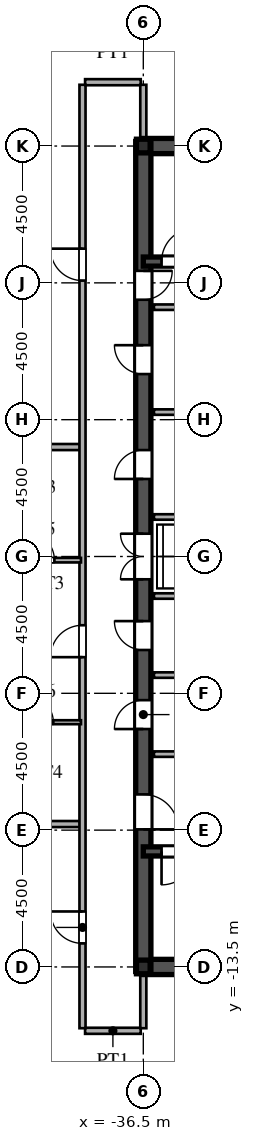
"""IFC4 building model, lengths in metres.
Left out: names, types, materials, properties, quantities, classifications, styles, units other than length and angle.
Written with IfcOpenShell. Run it as: python <this file> out.ifc"""

import sys

from ifc_helpers import new_model, si_unit, direction, frame, frame_2d, origin, origin_2d, place, context, subcontext, project, spatial, rectangle, i_section, extrude, source, transform, mapped, element, fill, save


model = new_model("IFC4")
c1 = context("Model", 3, precision=1e-05, world=origin(), true_north=direction((0.0, 1.0)))
c2 = subcontext(c1, "Body", "Model", "MODEL_VIEW")
j1 = project(units=[si_unit("LENGTHUNIT", "METRE"), si_unit("PLANEANGLEUNIT", "RADIAN")], contexts=[c1])
p1 = place(None, origin())
s1 = spatial("IfcSite", under=j1, at=p1, CompositionType="ELEMENT")
p2 = place(p1, origin())
s2 = spatial("IfcBuilding", under=s1, at=p2, CompositionType="ELEMENT")
p3 = place(p2, frame((0.0, 0.0, 243.15)))
s3 = spatial("IfcBuildingStorey", under=s2, at=p3, CompositionType="ELEMENT", Elevation=243.15)
m1 = source(origin(), c2, "Body", "SweptSolid", [
    extrude(i_section(OverallWidth=0.45, OverallDepth=0.45, WebThickness=0.016, FlangeThickness=0.025, at=origin_2d()), origin(), (0.0, 0.0, 1.0), 3.75),
])
for number, where, z_axis, x_axis in (
    (1, (-36.5, -13.5, 0.0), (0.0, 0.0, 1.0), (1.0, 0.0, 0.0)),
    (2, (-36.5, 13.5, 0.0), (0.0, 0.0, 1.0), (1.0, 0.0, 0.0)),
):
    element("IfcColumn", number, at=place(p3, frame(where, z_axis=z_axis, x_axis=x_axis)), inside=s3, PredefinedType="COLUMN", context=c2, shape_type="MappedRepresentation", body=[
        mapped(m1, transform((0.0, 0.0, 0.0), scale=1.0)),
    ])
for number, where, z_axis, x_axis in (
    (3, (-36.5, -13.5, 0.0), (0.0, 0.0, 1.0), (1.0, 0.0, 0.0)),
    (4, (-36.5, 13.5, 0.0), (0.0, 0.0, 1.0), (1.0, 0.0, 0.0)),
):
    element("IfcWall", number, at=place(p3, frame(where, z_axis=z_axis, x_axis=x_axis)), inside=s3, PredefinedType="SHEAR", context=c2, shape_type="SweptSolid", body=[
        extrude(rectangle(XDim=9.0, YDim=0.5, at=frame_2d((4.5, 0.0))), origin(), (0.0, 0.0, 1.0), 3.53),
    ])
p4 = place(p3, frame((-36.5, -13.65, 0.0), z_axis=(0.0, 0.0, 1.0), x_axis=(0.0, 1.0, 0.0)))
e5 = element("IfcWall", 5, at=p4, inside=s3, PredefinedType="SHEAR", context=c2, shape_type="SweptSolid", body=[
    extrude(rectangle(XDim=7.15, YDim=0.5, at=frame_2d((3.575, 0.0))), origin(), (0.0, 0.0, 1.0), 3.53),
])
p5 = place(p4, frame((4.675, 0.0, 0.0)))
e6 = element("IfcOpeningElement", 6, at=p5, cuts=e5, PredefinedType="OPENING", context=c2, shape_type="SweptSolid", body=[
    extrude(rectangle(XDim=1.15, YDim=2.2, at=frame_2d((0.575, 1.1))), frame((0.0, 0.26, 0.0), z_axis=(0.0, -1.0, 0.0), x_axis=(1.0, 0.0, 0.0)), (0.0, 0.0, 1.0), 0.52),
])
p6 = place(p3, frame((-36.5, -1.3, 0.0), z_axis=(0.0, 0.0, 1.0), x_axis=(0.0, 1.0, 0.0)))
e7 = element("IfcWall", 7, at=p6, inside=s3, PredefinedType="SHEAR", context=c2, shape_type="SweptSolid", body=[
    extrude(rectangle(XDim=2.6, YDim=0.5, at=frame_2d((1.3, 0.0))), origin(), (0.0, 0.0, 1.0), 3.53),
])
p7 = place(p6, frame((0.55, 0.0, 0.0)))
e8 = element("IfcOpeningElement", 8, at=p7, cuts=e7, PredefinedType="OPENING", context=c2, shape_type="SweptSolid", body=[
    extrude(rectangle(XDim=1.5, YDim=2.3, at=frame_2d((0.75, 1.15))), frame((0.0, 0.26, 0.0), z_axis=(0.0, -1.0, 0.0), x_axis=(1.0, 0.0, 0.0)), (0.0, 0.0, 1.0), 0.52),
])
p8 = place(p3, frame((-36.5, 8.2, 0.0), z_axis=(0.0, 0.0, 1.0), x_axis=(0.0, 1.0, 0.0)))
e9 = element("IfcWall", 9, at=p8, inside=s3, PredefinedType="SHEAR", context=c2, shape_type="SweptSolid", body=[
    extrude(rectangle(XDim=5.45, YDim=0.5, at=frame_2d((2.725, 0.0))), origin(), (0.0, 0.0, 1.0), 3.53),
])
p9 = place(p8, frame((0.245, 0.0, 0.0)))
e10 = element("IfcOpeningElement", 10, at=p9, cuts=e9, PredefinedType="OPENING", context=c2, shape_type="SweptSolid", body=[
    extrude(rectangle(XDim=0.95, YDim=2.15, at=frame_2d((0.475, 1.075))), frame((0.0, 0.26, 0.0), z_axis=(0.0, -1.0, 0.0), x_axis=(1.0, 0.0, 0.0)), (0.0, 0.0, 1.0), 0.52),
])
p10 = place(p3, frame((-36.5, -6.5, 0.0), z_axis=(0.0, 0.0, 1.0), x_axis=(0.0, 1.0, 0.0)))
e11 = element("IfcWall", 11, at=p10, inside=s3, PredefinedType="SHEAR", context=c2, shape_type="SweptSolid", body=[
    extrude(rectangle(XDim=2.6, YDim=0.5, at=frame_2d((1.3, 0.0))), origin(), (0.0, 0.0, 1.0), 3.53),
])
p11 = place(p10, frame((0.825, 0.0, 0.0)))
e12 = element("IfcOpeningElement", 12, at=p11, cuts=e11, PredefinedType="OPENING", context=c2, shape_type="SweptSolid", body=[
    extrude(rectangle(XDim=0.95, YDim=2.15, at=frame_2d((0.475, 1.075))), frame((0.0, 0.26, 0.0), z_axis=(0.0, -1.0, 0.0), x_axis=(1.0, 0.0, 0.0)), (0.0, 0.0, 1.0), 0.52),
])
p12 = place(p3, frame((-36.5, -3.9, 0.0), z_axis=(0.0, 0.0, 1.0), x_axis=(0.0, 1.0, 0.0)))
e13 = element("IfcWall", 13, at=p12, inside=s3, PredefinedType="SHEAR", context=c2, shape_type="SweptSolid", body=[
    extrude(rectangle(XDim=2.6, YDim=0.5, at=frame_2d((1.3, 0.0))), origin(), (0.0, 0.0, 1.0), 3.53),
])
p13 = place(p12, frame((0.825, 0.0, 0.0)))
e14 = element("IfcOpeningElement", 14, at=p13, cuts=e13, PredefinedType="OPENING", context=c2, shape_type="SweptSolid", body=[
    extrude(rectangle(XDim=0.95, YDim=2.15, at=frame_2d((0.475, 1.075))), frame((0.0, 0.26, 0.0), z_axis=(0.0, -1.0, 0.0), x_axis=(1.0, 0.0, 0.0)), (0.0, 0.0, 1.0), 0.52),
])
p14 = place(p3, frame((-36.5, 1.3, 0.0), z_axis=(0.0, 0.0, 1.0), x_axis=(0.0, 1.0, 0.0)))
e15 = element("IfcWall", 15, at=p14, inside=s3, PredefinedType="SHEAR", context=c2, shape_type="SweptSolid", body=[
    extrude(rectangle(XDim=3.45, YDim=0.5, at=frame_2d((1.725, 0.0))), origin(), (0.0, 0.0, 1.0), 3.53),
])
p15 = place(p14, frame((1.25, 0.0, 0.0)))
e16 = element("IfcOpeningElement", 16, at=p15, cuts=e15, PredefinedType="OPENING", context=c2, shape_type="SweptSolid", body=[
    extrude(rectangle(XDim=0.95, YDim=2.15, at=frame_2d((0.475, 1.075))), frame((0.0, 0.26, 0.0), z_axis=(0.0, -1.0, 0.0), x_axis=(1.0, 0.0, 0.0)), (0.0, 0.0, 1.0), 0.52),
])
p16 = place(p3, frame((-36.5, 4.75, 0.0), z_axis=(0.0, 0.0, 1.0), x_axis=(0.0, 1.0, 0.0)))
e17 = element("IfcWall", 17, at=p16, inside=s3, PredefinedType="SHEAR", context=c2, shape_type="SweptSolid", body=[
    extrude(rectangle(XDim=3.45, YDim=0.5, at=frame_2d((1.725, 0.0))), origin(), (0.0, 0.0, 1.0), 3.53),
])
p17 = place(p16, frame((1.25, 0.0, 0.0)))
e18 = element("IfcOpeningElement", 18, at=p17, cuts=e17, PredefinedType="OPENING", context=c2, shape_type="SweptSolid", body=[
    extrude(rectangle(XDim=0.95, YDim=2.15, at=frame_2d((0.475, 1.075))), frame((0.0, 0.26, 0.0), z_axis=(0.0, -1.0, 0.0), x_axis=(1.0, 0.0, 0.0)), (0.0, 0.0, 1.0), 0.52),
])
p18 = place(p3, frame((-36.5, -9.7, 0.0), z_axis=(0.0, 0.0, 1.0), x_axis=(1.0, 0.0, 0.0)))
e19 = element("IfcWall", 19, at=p18, inside=s3, PredefinedType="SHEAR", context=c2, shape_type="SweptSolid", body=[
    extrude(rectangle(XDim=9.0, YDim=0.3, at=frame_2d((4.5, 0.0))), origin(), (0.0, 0.0, 1.0), 3.53),
])
p19 = place(p18, frame((0.6, 0.0, 0.0)))
e20 = element("IfcOpeningElement", 20, at=p19, cuts=e19, PredefinedType="OPENING", context=c2, shape_type="SweptSolid", body=[
    extrude(rectangle(XDim=1.1, YDim=2.2, at=frame_2d((0.55, 1.1))), frame((0.0, 0.16, 0.0), z_axis=(0.0, -1.0, 0.0), x_axis=(1.0, 0.0, 0.0)), (0.0, 0.0, 1.0), 0.32),
])
p20 = place(p3, frame((-36.5, 9.7, 0.0), z_axis=(0.0, 0.0, 1.0), x_axis=(1.0, 0.0, 0.0)))
e21 = element("IfcWall", 21, at=p20, inside=s3, PredefinedType="SHEAR", context=c2, shape_type="SweptSolid", body=[
    extrude(rectangle(XDim=9.0, YDim=0.3, at=frame_2d((4.5, 0.0))), origin(), (0.0, 0.0, 1.0), 3.53),
])
p21 = place(p20, frame((0.6, 0.0, 0.0)))
e22 = element("IfcOpeningElement", 22, at=p21, cuts=e21, PredefinedType="OPENING", context=c2, shape_type="SweptSolid", body=[
    extrude(rectangle(XDim=1.1, YDim=2.2, at=frame_2d((0.55, 1.1))), frame((0.0, 0.16, 0.0), z_axis=(0.0, -1.0, 0.0), x_axis=(1.0, 0.0, 0.0)), (0.0, 0.0, 1.0), 0.32),
])
for number, where, z_axis, x_axis in (
    (23, (-36.15, -6.5, 0.0), (0.0, 0.0, 1.0), (1.0, 0.0, 0.0)),
    (24, (-36.15, 8.2, 0.0), (0.0, 0.0, 1.0), (1.0, 0.0, 0.0)),
):
    element("IfcWall", number, at=place(p3, frame(where, z_axis=z_axis, x_axis=x_axis)), inside=s3, PredefinedType="PARTITIONING", context=c2, shape_type="SweptSolid", body=[
        extrude(rectangle(XDim=5.7, YDim=0.18, at=frame_2d((2.85, 0.0))), origin(), (0.0, 0.0, 1.0), 3.53),
    ])
for number, where, z_axis, x_axis in (
    (25, (-36.15, -1.3, 0.0), (0.0, 0.0, 1.0), (1.0, 0.0, 0.0)),
    (26, (-36.15, 1.3, 0.0), (0.0, 0.0, 1.0), (1.0, 0.0, 0.0)),
    (27, (-36.15, -3.9, 0.0), (0.0, 0.0, 1.0), (1.0, 0.0, 0.0)),
    (28, (-36.15, 4.75, 0.0), (0.0, 0.0, 1.0), (1.0, 0.0, 0.0)),
):
    element("IfcWall", number, at=place(p3, frame(where, z_axis=z_axis, x_axis=x_axis)), inside=s3, PredefinedType="PARTITIONING", context=c2, shape_type="SweptSolid", body=[
        extrude(rectangle(XDim=2.95, YDim=0.18, at=frame_2d((1.475, 0.0))), origin(), (0.0, 0.0, 1.0), 3.53),
    ])
p22 = place(p3, frame((-38.415, -15.6, 0.0), z_axis=(0.0, 0.0, 1.0), x_axis=(1.0, 0.0, 0.0)))
e29 = element("IfcWall", 29, at=p22, inside=s3, PredefinedType="PARTITIONING", context=c2, shape_type="SweptSolid", body=[
    extrude(rectangle(XDim=1.83, YDim=0.2, at=frame_2d((0.915, 0.0))), origin(), (0.0, 0.0, 1.0), 3.53),
])
p23 = place(p3, frame((-55.343, -8.8, 0.0), z_axis=(0.0, 0.0, 1.0), x_axis=(1.0, 0.0, 0.0)))
e30 = element("IfcWall", 30, at=p23, inside=s3, PredefinedType="PARTITIONING", context=c2, shape_type="SweptSolid", body=[
    extrude(rectangle(XDim=16.763, YDim=0.2, at=frame_2d((8.381, 0.0))), origin(), (0.0, 0.0, 1.0), 3.53),
])
p24 = place(p3, frame((-41.25, -5.45, 0.0), z_axis=(0.0, 0.0, 1.0), x_axis=(1.0, 0.0, 0.0)))
e31 = element("IfcWall", 31, at=p24, inside=s3, PredefinedType="PARTITIONING", context=c2, shape_type="SweptSolid", body=[
    extrude(rectangle(XDim=2.7, YDim=0.13, at=frame_2d((1.35, 0.0))), origin(), (0.0, 0.0, 1.0), 3.53),
])
p25 = place(p24, frame((0.91, 0.0, 0.0)))
e32 = element("IfcOpeningElement", 32, at=p25, cuts=e31, PredefinedType="OPENING", context=c2, shape_type="SweptSolid", body=[
    extrude(rectangle(XDim=0.88, YDim=2.1, at=frame_2d((0.44, 1.05))), frame((0.0, 0.075, 0.0), z_axis=(0.0, -1.0, 0.0), x_axis=(1.0, 0.0, 0.0)), (0.0, 0.0, 1.0), 0.15),
])
p26 = place(p3, frame((-41.25, -0.12, 0.0), z_axis=(0.0, 0.0, 1.0), x_axis=(1.0, 0.0, 0.0)))
e33 = element("IfcWall", 33, at=p26, inside=s3, PredefinedType="PARTITIONING", context=c2, shape_type="SweptSolid", body=[
    extrude(rectangle(XDim=2.7, YDim=0.15, at=frame_2d((1.35, 0.0))), origin(), (0.0, 0.0, 1.0), 3.53),
])
p27 = place(p26, frame((0.875, 0.0, 0.0)))
e34 = element("IfcOpeningElement", 34, at=p27, cuts=e33, PredefinedType="OPENING", context=c2, shape_type="SweptSolid", body=[
    extrude(rectangle(XDim=0.95, YDim=2.15, at=frame_2d((0.475, 1.075))), frame((0.0, 0.085, 0.0), z_axis=(0.0, -1.0, 0.0), x_axis=(1.0, 0.0, 0.0)), (0.0, 0.0, 1.0), 0.17),
])
p28 = place(p3, frame((-64.01, 3.6, 0.0), z_axis=(0.0, 0.0, 1.0), x_axis=(1.0, 0.0, 0.0)))
e35 = element("IfcWall", 35, at=p28, inside=s3, PredefinedType="PARTITIONING", context=c2, shape_type="SweptSolid", body=[
    extrude(rectangle(XDim=25.43, YDim=0.2, at=frame_2d((12.715, 0.0))), origin(), (0.0, 0.0, 1.0), 3.53),
])
p29 = place(p3, frame((-38.415, 15.6, 0.0), z_axis=(0.0, 0.0, 1.0), x_axis=(1.0, 0.0, 0.0)))
e36 = element("IfcWall", 36, at=p29, inside=s3, PredefinedType="PARTITIONING", context=c2, shape_type="SweptSolid", body=[
    extrude(rectangle(XDim=1.83, YDim=0.2, at=frame_2d((0.915, 0.0))), origin(), (0.0, 0.0, 1.0), 3.53),
])
p30 = place(p3, frame((-38.5, -15.515, 0.0), z_axis=(0.0, 0.0, 1.0), x_axis=(0.0, 1.0, 0.0)))
e37 = element("IfcWall", 37, at=p30, inside=s3, PredefinedType="PARTITIONING", context=c2, shape_type="SweptSolid", body=[
    extrude(rectangle(XDim=31.03, YDim=0.2, at=frame_2d((15.515, 0.0))), origin(), (0.0, 0.0, 1.0), 3.53),
])
p31 = place(p30, frame((2.79, 0.0, 0.0)))
e38 = element("IfcOpeningElement", 38, at=p31, cuts=e37, PredefinedType="OPENING", context=c2, shape_type="SweptSolid", body=[
    extrude(rectangle(XDim=1.05, YDim=2.25, at=frame_2d((0.525, 1.125))), frame((0.0, 0.11, 0.0), z_axis=(0.0, -1.0, 0.0), x_axis=(1.0, 0.0, 0.0)), (0.0, 0.0, 1.0), 0.22),
])
p32 = place(p30, frame((12.204, 0.0, 0.0)))
e39 = element("IfcOpeningElement", 39, at=p32, cuts=e37, PredefinedType="OPENING", context=c2, shape_type="SweptSolid", body=[
    extrude(rectangle(XDim=1.05, YDim=2.25, at=frame_2d((0.525, 1.125))), frame((0.0, 0.11, 0.0), z_axis=(0.0, -1.0, 0.0), x_axis=(1.0, 0.0, 0.0)), (0.0, 0.0, 1.0), 0.22),
])
p33 = place(p30, frame((24.59, 0.0, 0.0)))
e40 = element("IfcOpeningElement", 40, at=p33, cuts=e37, PredefinedType="OPENING", context=c2, shape_type="SweptSolid", body=[
    extrude(rectangle(XDim=1.05, YDim=2.25, at=frame_2d((0.525, 1.125))), frame((0.0, 0.11, 0.0), z_axis=(0.0, -1.0, 0.0), x_axis=(1.0, 0.0, 0.0)), (0.0, 0.0, 1.0), 0.22),
])
for number, where, z_axis, x_axis in (
    (41, (-36.5, -15.515, 0.0), (0.0, 0.0, 1.0), (0.0, 1.0, 0.0)),
    (42, (-36.5, 13.755, 0.0), (0.0, 0.0, 1.0), (0.0, 1.0, 0.0)),
):
    element("IfcWall", number, at=place(p3, frame(where, z_axis=z_axis, x_axis=x_axis)), inside=s3, PredefinedType="PARTITIONING", context=c2, shape_type="SweptSolid", body=[
        extrude(rectangle(XDim=1.76, YDim=0.2, at=frame_2d((0.88, 0.0))), origin(), (0.0, 0.0, 1.0), 2.93),
    ])
m2 = source(origin(), c2, "Body", "SweptSolid", [
    extrude(rectangle(XDim=1.15, YDim=2.2, at=frame_2d((0.575, 1.1))), frame((0.0, 0.025, 0.0), z_axis=(0.0, -1.0, 0.0), x_axis=(1.0, 0.0, 0.0)), (0.0, 0.0, 1.0), 0.05),
])
p34 = place(p5, frame((1.15, 0.0, 0.0), z_axis=(0.0, 0.0, 1.0), x_axis=(-1.0, 0.0, 0.0)))
e43 = element("IfcDoor", 43, at=p34, inside=s3, OperationType="SINGLE_SWING_LEFT", PredefinedType="DOOR", context=c2, shape_type="MappedRepresentation", body=[
    mapped(m2, transform((0.0, 0.0, 0.0), scale=1.0)),
])
fill(e6, e43)
m3 = source(origin(), c2, "Body", "SweptSolid", [
    extrude(rectangle(XDim=1.5, YDim=2.3, at=frame_2d((0.75, 1.15))), frame((0.0, 0.025, 0.0), z_axis=(0.0, -1.0, 0.0), x_axis=(1.0, 0.0, 0.0)), (0.0, 0.0, 1.0), 0.05),
])
p35 = place(p7, origin())
e44 = element("IfcDoor", 44, at=p35, inside=s3, OperationType="DOUBLE_SWING_LEFT", PredefinedType="DOOR", context=c2, shape_type="MappedRepresentation", body=[
    mapped(m3, transform((0.0, 0.0, 0.0), scale=1.0)),
])
fill(e8, e44)
m4 = source(origin(), c2, "Body", "SweptSolid", [
    extrude(rectangle(XDim=0.95, YDim=2.15, at=frame_2d((0.475, 1.075))), frame((0.0, 0.025, 0.0), z_axis=(0.0, -1.0, 0.0), x_axis=(1.0, 0.0, 0.0)), (0.0, 0.0, 1.0), 0.05),
])
p36 = place(p9, frame((0.95, 0.0, 0.0), z_axis=(0.0, 0.0, 1.0), x_axis=(-1.0, 0.0, 0.0)))
e45 = element("IfcDoor", 45, at=p36, inside=s3, OperationType="SINGLE_SWING_RIGHT", PredefinedType="DOOR", context=c2, shape_type="MappedRepresentation", body=[
    mapped(m4, transform((0.0, 0.0, 0.0), scale=1.0)),
])
fill(e10, e45)
p37 = place(p11, origin())
e46 = element("IfcDoor", 46, at=p37, inside=s3, OperationType="SINGLE_SWING_LEFT", PredefinedType="DOOR", context=c2, shape_type="MappedRepresentation", body=[
    mapped(m4, transform((0.0, 0.0, 0.0), scale=1.0)),
])
fill(e12, e46)
p38 = place(p13, origin())
e47 = element("IfcDoor", 47, at=p38, inside=s3, OperationType="SINGLE_SWING_RIGHT", PredefinedType="DOOR", context=c2, shape_type="MappedRepresentation", body=[
    mapped(m4, transform((0.0, 0.0, 0.0), scale=1.0)),
])
fill(e14, e47)
p39 = place(p15, origin())
e48 = element("IfcDoor", 48, at=p39, inside=s3, OperationType="SINGLE_SWING_LEFT", PredefinedType="DOOR", context=c2, shape_type="MappedRepresentation", body=[
    mapped(m4, transform((0.0, 0.0, 0.0), scale=1.0)),
])
fill(e16, e48)
p40 = place(p17, origin())
e49 = element("IfcDoor", 49, at=p40, inside=s3, OperationType="SINGLE_SWING_RIGHT", PredefinedType="DOOR", context=c2, shape_type="MappedRepresentation", body=[
    mapped(m4, transform((0.0, 0.0, 0.0), scale=1.0)),
])
fill(e18, e49)
m5 = source(origin(), c2, "Body", "SweptSolid", [
    extrude(rectangle(XDim=1.1, YDim=2.2, at=frame_2d((0.55, 1.1))), frame((0.0, 0.025, 0.0), z_axis=(0.0, -1.0, 0.0), x_axis=(1.0, 0.0, 0.0)), (0.0, 0.0, 1.0), 0.05),
])
p41 = place(p19, frame((1.1, 0.0, 0.0), z_axis=(0.0, 0.0, 1.0), x_axis=(-1.0, 0.0, 0.0)))
e50 = element("IfcDoor", 50, at=p41, inside=s3, OperationType="SINGLE_SWING_LEFT", PredefinedType="DOOR", context=c2, shape_type="MappedRepresentation", body=[
    mapped(m5, transform((0.0, 0.0, 0.0), scale=1.0)),
])
fill(e20, e50)
p42 = place(p21, origin())
e51 = element("IfcDoor", 51, at=p42, inside=s3, OperationType="SINGLE_SWING_RIGHT", PredefinedType="DOOR", context=c2, shape_type="MappedRepresentation", body=[
    mapped(m5, transform((0.0, 0.0, 0.0), scale=1.0)),
])
fill(e22, e51)
m6 = source(origin(), c2, "Body", "SweptSolid", [
    extrude(rectangle(XDim=0.88, YDim=2.1, at=frame_2d((0.44, 1.05))), frame((0.0, 0.025, 0.0), z_axis=(0.0, -1.0, 0.0), x_axis=(1.0, 0.0, 0.0)), (0.0, 0.0, 1.0), 0.05),
])
p43 = place(p25, origin())
e52 = element("IfcDoor", 52, at=p43, inside=s3, OperationType="SINGLE_SWING_LEFT", PredefinedType="DOOR", context=c2, shape_type="MappedRepresentation", body=[
    mapped(m6, transform((0.0, 0.0, 0.0), scale=1.0)),
])
fill(e32, e52)
m7 = source(origin(), c2, "Body", "SweptSolid", [
    extrude(rectangle(XDim=0.95, YDim=2.15, at=frame_2d((0.475, 1.075))), frame((0.0, 0.025, 0.0), z_axis=(0.0, -1.0, 0.0), x_axis=(1.0, 0.0, 0.0)), (0.0, 0.0, 1.0), 0.05),
])
p44 = place(p27, origin())
e53 = element("IfcDoor", 53, at=p44, inside=s3, OperationType="SINGLE_SWING_LEFT", PredefinedType="DOOR", context=c2, shape_type="MappedRepresentation", body=[
    mapped(m7, transform((0.0, 0.0, 0.0), scale=1.0)),
])
fill(e34, e53)
m8 = source(origin(), c2, "Body", "SweptSolid", [
    extrude(rectangle(XDim=1.05, YDim=2.25, at=frame_2d((0.525, 1.125))), frame((0.0, 0.025, 0.0), z_axis=(0.0, -1.0, 0.0), x_axis=(1.0, 0.0, 0.0)), (0.0, 0.0, 1.0), 0.05),
])
p45 = place(p31, origin())
e54 = element("IfcDoor", 54, at=p45, inside=s3, OperationType="SINGLE_SWING_RIGHT", PredefinedType="DOOR", context=c2, shape_type="MappedRepresentation", body=[
    mapped(m8, transform((0.0, 0.0, 0.0), scale=1.0)),
])
fill(e38, e54)
p46 = place(p32, origin())
e55 = element("IfcDoor", 55, at=p46, inside=s3, OperationType="SINGLE_SWING_LEFT", PredefinedType="DOOR", context=c2, shape_type="MappedRepresentation", body=[
    mapped(m8, transform((0.0, 0.0, 0.0), scale=1.0)),
])
fill(e39, e55)
p47 = place(p33, origin())
e56 = element("IfcDoor", 56, at=p47, inside=s3, OperationType="SINGLE_SWING_RIGHT", PredefinedType="DOOR", context=c2, shape_type="MappedRepresentation", body=[
    mapped(m8, transform((0.0, 0.0, 0.0), scale=1.0)),
])
fill(e40, e56)
save(model, sys.argv[1])
